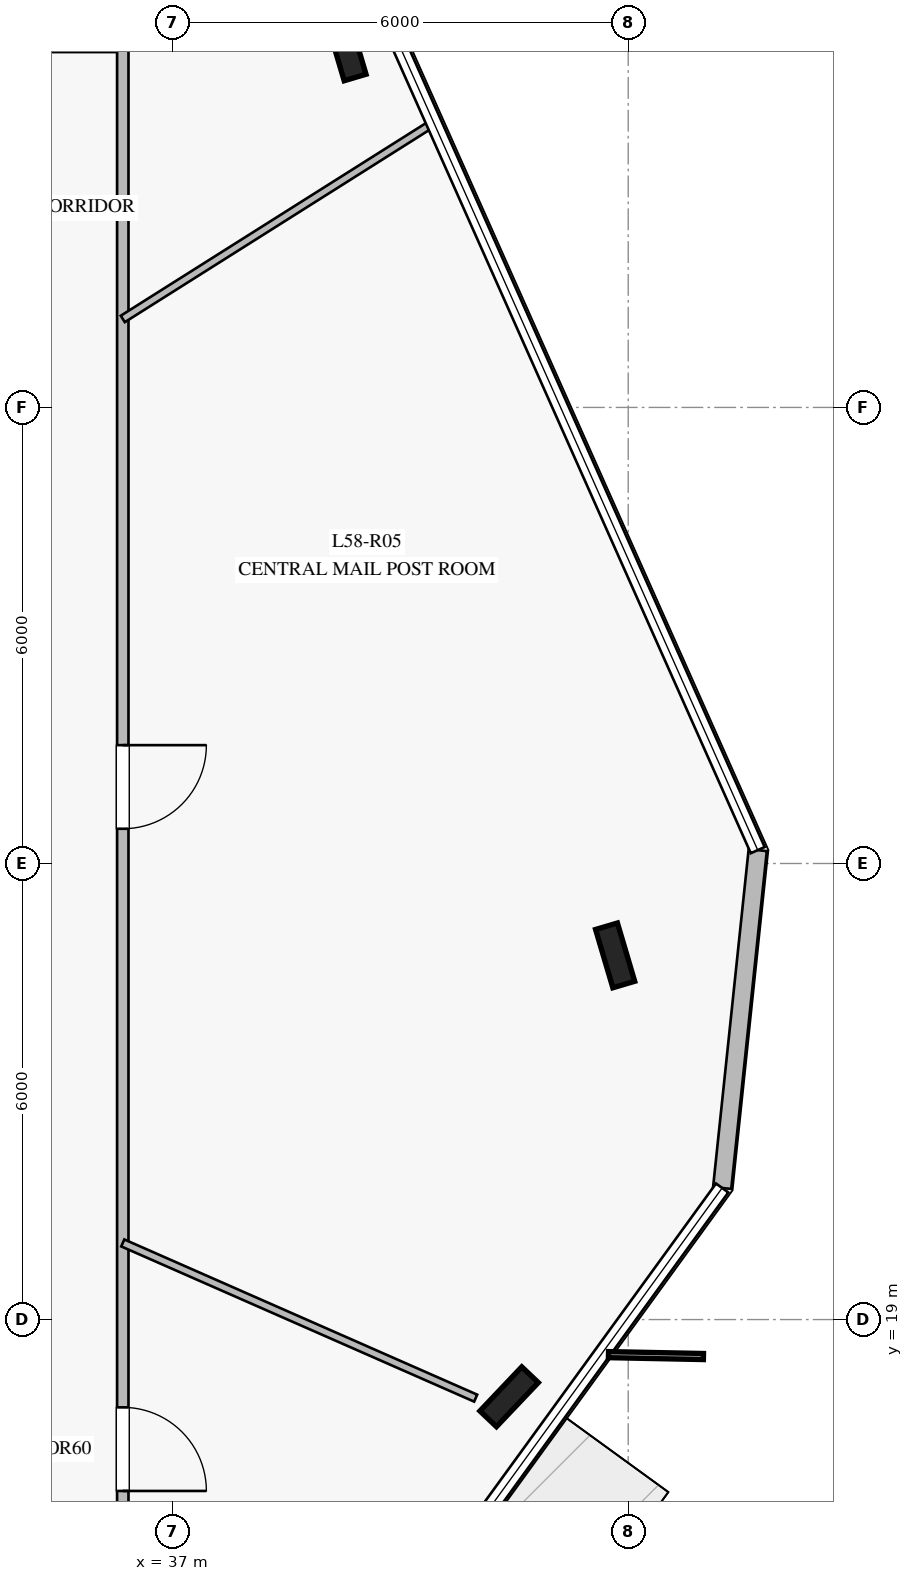
"""IFC4 building model, lengths in metres.
Left out: names, types, materials, properties, quantities, classifications, styles, units other than length and angle.
Written with IfcOpenShell. Run it as: python <this file> out.ifc"""

import sys

from ifc_helpers import new_model, si_unit, direction, frame, frame_2d, origin, origin_2d, place, context, subcontext, project, spatial, rectangle, i_section, extrude, element, fill, save


model = new_model("IFC4")
c1 = context("Model", 3, precision=1e-05, world=origin(), true_north=direction((0.0, 1.0)))
c2 = subcontext(c1, "Body", "Model", "MODEL_VIEW")
j1 = project(units=[si_unit("LENGTHUNIT", "METRE"), si_unit("PLANEANGLEUNIT", "RADIAN")], contexts=[c1])
p1 = place(None, origin())
s1 = spatial("IfcSite", under=j1, at=p1, CompositionType="ELEMENT")
p2 = place(p1, origin())
s2 = spatial("IfcBuilding", under=s1, at=p2, CompositionType="ELEMENT")
p3 = place(p2, frame((0.0, 0.0, 240.8)))
s3 = spatial("IfcBuildingStorey", under=s2, at=p3, CompositionType="ELEMENT", Elevation=240.8)
for number, where, z_axis, x_axis in (
    (1, (41.433, 17.984, 0.0), (0.0, 0.0, 1.0), (0.688, 0.725, 0.0)),
    (2, (42.828, 23.791, 0.0), (0.0, 0.0, 1.0), (-0.284, 0.959, 0.0)),
    (3, (39.293, 35.724, 0.0), (0.0, 0.0, 1.0), (-0.284, 0.959, 0.0)),
):
    element("IfcColumn", number, at=place(p3, frame(where, z_axis=z_axis, x_axis=x_axis)), inside=s3, PredefinedType="COLUMN", context=c2, shape_type="SweptSolid", body=[
        extrude(i_section(OverallWidth=0.3, OverallDepth=0.8, WebThickness=0.018, FlangeThickness=0.033, at=origin_2d()), origin(), (0.0, 0.0, 1.0), 4.0),
    ])
p4 = place(p3, frame((44.236, 20.731, 0.0), z_axis=(0.0, 0.0, 1.0), x_axis=(0.104710374516, 0.994502758904, 0.0)))
e4 = element("IfcWall", 4, at=p4, inside=s3, PredefinedType="STANDARD", context=c2, shape_type="SweptSolid", body=[
    extrude(rectangle(XDim=4.47, YDim=0.24, at=frame_2d((2.235, 0.0))), origin(), (0.0, 0.0, 1.0), 3.7),
])
p5 = place(p3, frame((13.65, 35.75, 0.0), z_axis=(0.0, 0.0, 1.0), x_axis=(1.0, 0.0, 0.0)))
e5 = element("IfcWall", 5, at=p5, inside=s3, PredefinedType="PARTITIONING", context=c2, shape_type="SweptSolid", body=[
    extrude(rectangle(XDim=22.7, YDim=0.15, at=frame_2d((11.35, 0.0))), origin(), (0.0, 0.0, 1.0), 3.2),
])
p6 = place(p5, frame((16.078, 0.0, 0.0)))
e6 = element("IfcOpeningElement", 6, at=p6, cuts=e5, PredefinedType="OPENING", context=c2, shape_type="SweptSolid", body=[
    extrude(rectangle(XDim=1.1, YDim=2.2, at=frame_2d((0.55, 1.1))), frame((0.0, 0.085, 0.0), z_axis=(0.0, -1.0, 0.0), x_axis=(1.0, 0.0, 0.0)), (0.0, 0.0, 1.0), 0.17),
])
p7 = place(p5, frame((5.75, 0.0, 0.0)))
e7 = element("IfcOpeningElement", 7, at=p7, cuts=e5, PredefinedType="OPENING", context=c2, shape_type="SweptSolid", body=[
    extrude(rectangle(XDim=1.1, YDim=2.2, at=frame_2d((0.55, 1.1))), frame((0.0, 0.085, 0.0), z_axis=(0.0, -1.0, 0.0), x_axis=(1.0, 0.0, 0.0)), (0.0, 0.0, 1.0), 0.17),
])
p8 = place(p3, frame((36.35, 35.75, 0.0), z_axis=(0.0, 0.0, 1.0), x_axis=(0.0, -1.0, 0.0)))
e8 = element("IfcWall", 8, at=p8, inside=s3, PredefinedType="PARTITIONING", context=c2, shape_type="SweptSolid", body=[
    extrude(rectangle(XDim=21.5, YDim=0.15, at=frame_2d((10.75, 0.0))), origin(), (0.0, 0.0, 1.0), 3.2),
])
p9 = place(p8, frame((17.905, 0.0, 0.0)))
e9 = element("IfcOpeningElement", 9, at=p9, cuts=e8, PredefinedType="OPENING", context=c2, shape_type="SweptSolid", body=[
    extrude(rectangle(XDim=1.1, YDim=2.2, at=frame_2d((0.55, 1.1))), frame((0.0, 0.085, 0.0), z_axis=(0.0, -1.0, 0.0), x_axis=(1.0, 0.0, 0.0)), (0.0, 0.0, 1.0), 0.17),
])
p10 = place(p8, frame((9.193, 0.0, 0.0)))
e10 = element("IfcOpeningElement", 10, at=p10, cuts=e8, PredefinedType="OPENING", context=c2, shape_type="SweptSolid", body=[
    extrude(rectangle(XDim=1.1, YDim=2.2, at=frame_2d((0.55, 1.1))), frame((0.0, 0.085, 0.0), z_axis=(0.0, -1.0, 0.0), x_axis=(1.0, 0.0, 0.0)), (0.0, 0.0, 1.0), 0.17),
])
p11 = place(p3, frame((36.35, 20.008, 0.0), z_axis=(0.0, 0.0, 1.0), x_axis=(0.915376770815, -0.402598270553, 0.0)))
e11 = element("IfcWall", 11, at=p11, inside=s3, PredefinedType="MOVABLE", context=c2, shape_type="SweptSolid", body=[
    extrude(rectangle(XDim=5.072, YDim=0.1, at=frame_2d((2.536, 0.0))), origin(), (0.0, 0.0, 1.0), 3.1),
])
p12 = place(p3, frame((36.35, 32.164, 0.0), z_axis=(0.0, 0.0, 1.0), x_axis=(0.845632033333, 0.53376630111, 0.0)))
e12 = element("IfcWall", 12, at=p12, inside=s3, PredefinedType="MOVABLE", context=c2, shape_type="SweptSolid", body=[
    extrude(rectangle(XDim=4.822, YDim=0.1, at=frame_2d((2.411, 0.0))), origin(), (0.0, 0.0, 1.0), 3.1),
])
p13 = place(p9, origin())
e13 = element("IfcDoor", 13, at=p13, inside=s3, OperationType="SINGLE_SWING_RIGHT", PredefinedType="DOOR", context=c2, shape_type="SweptSolid", body=[
    extrude(rectangle(XDim=1.1, YDim=2.2, at=frame_2d((0.55, 1.1))), frame((0.0, 0.025, 0.0), z_axis=(0.0, -1.0, 0.0), x_axis=(1.0, 0.0, 0.0)), (0.0, 0.0, 1.0), 0.05),
])
fill(e9, e13)
p14 = place(p10, origin())
e14 = element("IfcDoor", 14, at=p14, inside=s3, OperationType="SINGLE_SWING_LEFT", PredefinedType="DOOR", context=c2, shape_type="SweptSolid", body=[
    extrude(rectangle(XDim=1.1, YDim=2.2, at=frame_2d((0.55, 1.1))), frame((0.0, 0.025, 0.0), z_axis=(0.0, -1.0, 0.0), x_axis=(1.0, 0.0, 0.0)), (0.0, 0.0, 1.0), 0.05),
])
fill(e10, e14)
save(model, sys.argv[1])
